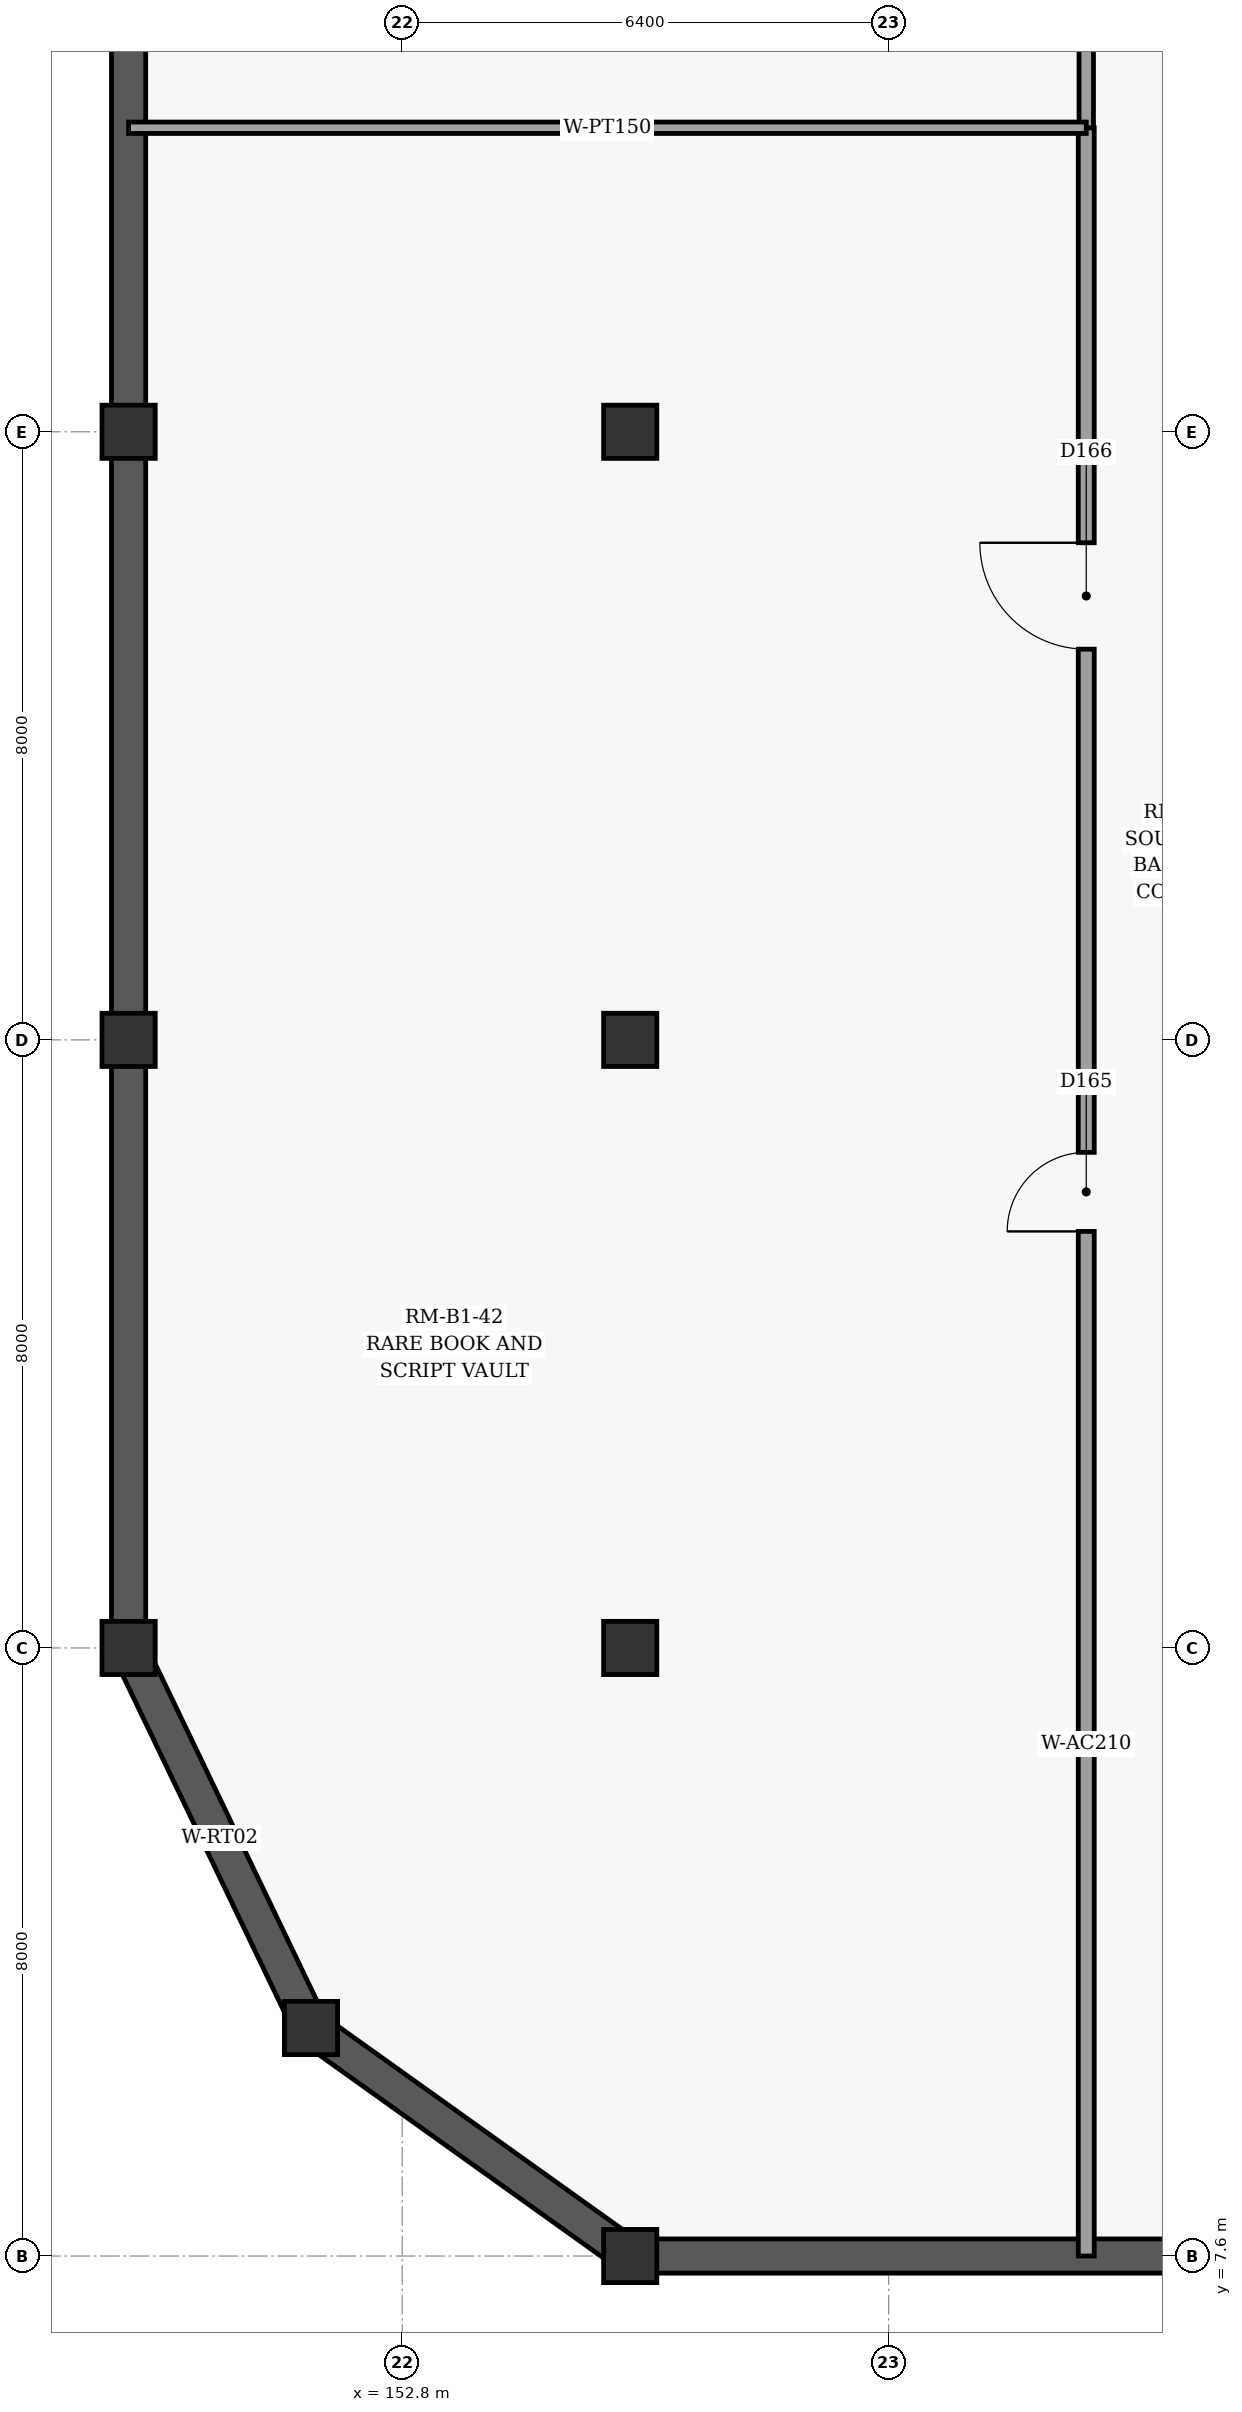
"""IFC4 building model, lengths in metres.
Left out: names, types, materials, properties, quantities, classifications, styles, units other than length and angle.
Written with IfcOpenShell. Run it as: python <this file> out.ifc"""

import sys

from ifc_helpers import new_model, si_unit, direction, frame, frame_2d, origin, origin_2d, place, context, subcontext, project, spatial, rectangle, extrude, element, fill, save


model = new_model("IFC4")
c1 = context("Model", 3, precision=1e-05, world=origin(), true_north=direction((0.0, 1.0)))
c2 = subcontext(c1, "Body", "Model", "MODEL_VIEW")
j1 = project(units=[si_unit("LENGTHUNIT", "METRE"), si_unit("PLANEANGLEUNIT", "RADIAN")], contexts=[c1])
p1 = place(None, origin())
s1 = spatial("IfcSite", under=j1, at=p1, CompositionType="ELEMENT")
p2 = place(p1, origin())
s2 = spatial("IfcBuilding", under=s1, at=p2, CompositionType="ELEMENT")
p3 = place(p2, frame((0.0, 0.0, -4.8)))
s3 = spatial("IfcBuildingStorey", under=s2, at=p3, CompositionType="ELEMENT", Elevation=-4.8)
for number, where, z_axis, x_axis in (
    (1, (149.2, 15.6, 0.0), (0.0, 0.0, 1.0), (1.0, 0.0, 0.0)),
    (2, (149.2, 23.6, 0.0), (0.0, 0.0, 1.0), (1.0, 0.0, 0.0)),
    (3, (149.2, 31.6, 0.0), (0.0, 0.0, 1.0), (1.0, 0.0, 0.0)),
    (4, (151.6, 10.6, 0.0), (0.0, 0.0, 1.0), (1.0, 0.0, 0.0)),
    (5, (155.8, 7.6, 0.0), (0.0, 0.0, 1.0), (1.0, 0.0, 0.0)),
    (6, (155.8, 15.6, 0.0), (0.0, 0.0, 1.0), (1.0, 0.0, 0.0)),
    (7, (155.8, 23.6, 0.0), (0.0, 0.0, 1.0), (1.0, 0.0, 0.0)),
    (8, (155.8, 31.6, 0.0), (0.0, 0.0, 1.0), (1.0, 0.0, 0.0)),
):
    element("IfcColumn", number, at=place(p3, frame(where, z_axis=z_axis, x_axis=x_axis)), inside=s3, PredefinedType="COLUMN", context=c2, shape_type="SweptSolid", body=[
        extrude(rectangle(XDim=0.7, YDim=0.7, at=origin_2d()), origin(), (0.0, 0.0, 1.0), 4.8),
    ])
p4 = place(p3, frame((151.6, 10.6, 0.0), z_axis=(0.0, 0.0, 1.0), x_axis=(-0.432752533251, 0.901512753634, 0.0)))
e9 = element("IfcWall", 9, at=p4, inside=s3, PredefinedType="USERDEFINED", context=c2, shape_type="SweptSolid", body=[
    extrude(rectangle(XDim=5.546, YDim=0.45, at=frame_2d((2.773, 0.0))), origin(), (0.0, 0.0, 1.0), 4.5),
])
p5 = place(p3, frame((149.2, 15.6, 0.0), z_axis=(0.0, 0.0, 1.0), x_axis=(0.0, 1.0, 0.0)))
e10 = element("IfcWall", 10, at=p5, inside=s3, PredefinedType="USERDEFINED", context=c2, shape_type="SweptSolid", body=[
    extrude(rectangle(XDim=48.0, YDim=0.45, at=frame_2d((24.0, 0.0))), origin(), (0.0, 0.0, 1.0), 3.65),
])
p6 = place(p3, frame((172.0, 7.6, 0.0), z_axis=(0.0, 0.0, 1.0), x_axis=(-1.0, 0.0, 0.0)))
e11 = element("IfcWall", 11, at=p6, inside=s3, PredefinedType="USERDEFINED", context=c2, shape_type="SweptSolid", body=[
    extrude(rectangle(XDim=16.2, YDim=0.45, at=frame_2d((8.1, 0.0))), origin(), (0.0, 0.0, 1.0), 3.65),
])
p7 = place(p3, frame((155.8, 7.6, 0.0), z_axis=(0.0, 0.0, 1.0), x_axis=(-0.813730275137, 0.581242668191, 0.0)))
e12 = element("IfcWall", 12, at=p7, inside=s3, PredefinedType="USERDEFINED", context=c2, shape_type="SweptSolid", body=[
    extrude(rectangle(XDim=5.161, YDim=0.45, at=frame_2d((2.581, 0.0))), origin(), (0.0, 0.0, 1.0), 4.5),
])
p8 = place(p3, frame((161.8, 7.6, 0.0), z_axis=(0.0, 0.0, 1.0), x_axis=(0.0, 1.0, 0.0)))
e13 = element("IfcWall", 13, at=p8, inside=s3, PredefinedType="PARTITIONING", context=c2, shape_type="SweptSolid", body=[
    extrude(rectangle(XDim=28.0, YDim=0.21, at=frame_2d((14.0, 0.0))), origin(), (0.0, 0.0, 1.0), 4.5),
])
p9 = place(p8, frame((13.48, 0.0, 0.0)))
e14 = element("IfcOpeningElement", 14, at=p9, cuts=e13, PredefinedType="OPENING", context=c2, shape_type="SweptSolid", body=[
    extrude(rectangle(XDim=1.04, YDim=2.2, at=frame_2d((0.52, 1.1))), frame((0.0, 0.115, 0.0), z_axis=(0.0, -1.0, 0.0), x_axis=(1.0, 0.0, 0.0)), (0.0, 0.0, 1.0), 0.23),
])
p10 = place(p8, frame((21.14, 0.0, 0.0)))
e15 = element("IfcOpeningElement", 15, at=p10, cuts=e13, PredefinedType="OPENING", context=c2, shape_type="SweptSolid", body=[
    extrude(rectangle(XDim=1.4, YDim=2.25, at=frame_2d((0.7, 1.125))), frame((0.0, 0.115, 0.0), z_axis=(0.0, -1.0, 0.0), x_axis=(1.0, 0.0, 0.0)), (0.0, 0.0, 1.0), 0.23),
])
p11 = place(p3, frame((161.8, 35.6, 0.0), z_axis=(0.0, 0.0, 1.0), x_axis=(0.0, 1.0, 0.0)))
e16 = element("IfcWall", 16, at=p11, inside=s3, PredefinedType="PARTITIONING", context=c2, shape_type="SweptSolid", body=[
    extrude(rectangle(XDim=28.0, YDim=0.19, at=frame_2d((14.0, 0.0))), origin(), (0.0, 0.0, 1.0), 4.5),
])
p12 = place(p11, frame((13.51, 0.0, 0.0)))
e17 = element("IfcOpeningElement", 17, at=p12, cuts=e16, PredefinedType="OPENING", context=c2, shape_type="SweptSolid", body=[
    extrude(rectangle(XDim=0.98, YDim=2.1, at=frame_2d((0.49, 1.05))), frame((0.0, 0.105, 0.0), z_axis=(0.0, -1.0, 0.0), x_axis=(1.0, 0.0, 0.0)), (0.0, 0.0, 1.0), 0.21),
])
p13 = place(p11, frame((21.14, 0.0, 0.0)))
e18 = element("IfcOpeningElement", 18, at=p13, cuts=e16, PredefinedType="OPENING", context=c2, shape_type="SweptSolid", body=[
    extrude(rectangle(XDim=1.4, YDim=2.25, at=frame_2d((0.7, 1.125))), frame((0.0, 0.105, 0.0), z_axis=(0.0, -1.0, 0.0), x_axis=(1.0, 0.0, 0.0)), (0.0, 0.0, 1.0), 0.21),
])
p14 = place(p3, frame((149.2, 35.6, 0.0), z_axis=(0.0, 0.0, 1.0), x_axis=(1.0, 0.0, 0.0)))
e19 = element("IfcWall", 19, at=p14, inside=s3, PredefinedType="PARTITIONING", context=c2, shape_type="SweptSolid", body=[
    extrude(rectangle(XDim=12.6, YDim=0.15, at=frame_2d((6.3, 0.0))), origin(), (0.0, 0.0, 1.0), 3.95),
])
p15 = place(p9, origin())
e20 = element("IfcDoor", 20, at=p15, inside=s3, OperationType="SINGLE_SWING_LEFT", PredefinedType="DOOR", context=c2, shape_type="SweptSolid", body=[
    extrude(rectangle(XDim=1.04, YDim=2.2, at=frame_2d((0.52, 1.1))), frame((0.0, 0.025, 0.0), z_axis=(0.0, -1.0, 0.0), x_axis=(1.0, 0.0, 0.0)), (0.0, 0.0, 1.0), 0.05),
])
fill(e14, e20)
p16 = place(p10, origin())
e21 = element("IfcDoor", 21, at=p16, inside=s3, OperationType="SINGLE_SWING_RIGHT", PredefinedType="DOOR", context=c2, shape_type="SweptSolid", body=[
    extrude(rectangle(XDim=1.4, YDim=2.25, at=frame_2d((0.7, 1.125))), frame((0.0, 0.025, 0.0), z_axis=(0.0, -1.0, 0.0), x_axis=(1.0, 0.0, 0.0)), (0.0, 0.0, 1.0), 0.05),
])
fill(e15, e21)
save(model, sys.argv[1])
